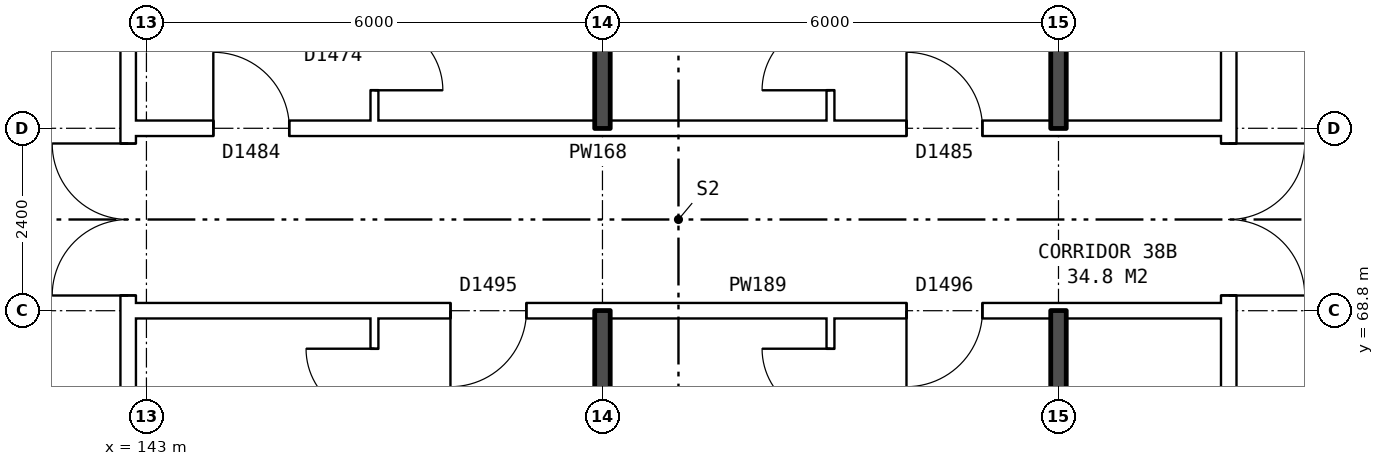
"""IFC4 building model, lengths in metres.
Left out: names, types, materials, properties, quantities, classifications, styles, units other than length and angle.
Written with IfcOpenShell. Run it as: python <this file> out.ifc"""

import sys

from ifc_helpers import new_model, si_unit, direction, frame, frame_2d, origin, place, context, subcontext, project, spatial, rectangle, extrude, element, fill, save


model = new_model("IFC4")
c1 = context("Model", 3, precision=1e-05, world=origin(), true_north=direction((0.0, 1.0)))
c2 = subcontext(c1, "Body", "Model", "MODEL_VIEW")
j1 = project(units=[si_unit("LENGTHUNIT", "METRE"), si_unit("PLANEANGLEUNIT", "RADIAN")], contexts=[c1])
p1 = place(None, origin())
s1 = spatial("IfcSite", under=j1, at=p1, CompositionType="ELEMENT")
p2 = place(p1, origin())
s2 = spatial("IfcBuilding", under=s1, at=p2, CompositionType="ELEMENT")
p3 = place(p2, frame((0.0, 0.0, 136.1)))
s3 = spatial("IfcBuildingStorey", under=s2, at=p3, CompositionType="ELEMENT", Elevation=136.1)
p4 = place(p3, frame((142.76, 63.9, 0.0), z_axis=(0.0, 0.0, 1.0), x_axis=(0.0, 1.0, 0.0)))
e1 = element("IfcWall", 1, at=p4, inside=s3, PredefinedType="PARTITIONING", context=c2, shape_type="SweptSolid", body=[
    extrude(rectangle(XDim=12.2, YDim=0.2, at=frame_2d((6.1, 0.0))), origin(), (0.0, 0.0, 1.0), 2.85),
])
p5 = place(p4, frame((5.1, 0.0, 0.0)))
e2 = element("IfcOpeningElement", 2, at=p5, cuts=e1, PredefinedType="OPENING", context=c2, shape_type="SweptSolid", body=[
    extrude(rectangle(XDim=2.0, YDim=2.1, at=frame_2d((1.0, 1.05))), frame((0.0, 0.11, 0.0), z_axis=(0.0, -1.0, 0.0), x_axis=(1.0, 0.0, 0.0)), (0.0, 0.0, 1.0), 0.22),
])
p6 = place(p3, frame((157.24, 63.9, 0.0), z_axis=(0.0, 0.0, 1.0), x_axis=(0.0, 1.0, 0.0)))
e3 = element("IfcWall", 3, at=p6, inside=s3, PredefinedType="PARTITIONING", context=c2, shape_type="SweptSolid", body=[
    extrude(rectangle(XDim=12.2, YDim=0.2, at=frame_2d((6.1, 0.0))), origin(), (0.0, 0.0, 1.0), 2.85),
])
p7 = place(p6, frame((5.1, 0.0, 0.0)))
e4 = element("IfcOpeningElement", 4, at=p7, cuts=e3, PredefinedType="OPENING", context=c2, shape_type="SweptSolid", body=[
    extrude(rectangle(XDim=2.0, YDim=2.1, at=frame_2d((1.0, 1.05))), frame((0.0, 0.11, 0.0), z_axis=(0.0, -1.0, 0.0), x_axis=(1.0, 0.0, 0.0)), (0.0, 0.0, 1.0), 0.22),
])
p8 = place(p3, frame((142.76, 68.8, 0.0), z_axis=(0.0, 0.0, 1.0), x_axis=(1.0, 0.0, 0.0)))
e5 = element("IfcWall", 5, at=p8, inside=s3, PredefinedType="PARTITIONING", context=c2, shape_type="SweptSolid", body=[
    extrude(rectangle(XDim=14.48, YDim=0.2, at=frame_2d((7.24, 0.0))), origin(), (0.0, 0.0, 1.0), 2.85),
])
p9 = place(p8, frame((4.24, 0.0, 0.0)))
e6 = element("IfcOpeningElement", 6, at=p9, cuts=e5, PredefinedType="OPENING", context=c2, shape_type="SweptSolid", body=[
    extrude(rectangle(XDim=1.0, YDim=2.1, at=frame_2d((0.5, 1.05))), frame((0.0, 0.11, 0.0), z_axis=(0.0, -1.0, 0.0), x_axis=(1.0, 0.0, 0.0)), (0.0, 0.0, 1.0), 0.22),
])
p10 = place(p8, frame((10.24, 0.0, 0.0)))
e7 = element("IfcOpeningElement", 7, at=p10, cuts=e5, PredefinedType="OPENING", context=c2, shape_type="SweptSolid", body=[
    extrude(rectangle(XDim=1.0, YDim=2.1, at=frame_2d((0.5, 1.05))), frame((0.0, 0.11, 0.0), z_axis=(0.0, -1.0, 0.0), x_axis=(1.0, 0.0, 0.0)), (0.0, 0.0, 1.0), 0.22),
])
p11 = place(p3, frame((142.76, 71.2, 0.0), z_axis=(0.0, 0.0, 1.0), x_axis=(1.0, 0.0, 0.0)))
e8 = element("IfcWall", 8, at=p11, inside=s3, PredefinedType="PARTITIONING", context=c2, shape_type="SweptSolid", body=[
    extrude(rectangle(XDim=14.48, YDim=0.2, at=frame_2d((7.24, 0.0))), origin(), (0.0, 0.0, 1.0), 2.85),
])
p12 = place(p11, frame((1.12, 0.0, 0.0)))
e9 = element("IfcOpeningElement", 9, at=p12, cuts=e8, PredefinedType="OPENING", context=c2, shape_type="SweptSolid", body=[
    extrude(rectangle(XDim=1.0, YDim=2.1, at=frame_2d((0.5, 1.05))), frame((0.0, 0.11, 0.0), z_axis=(0.0, -1.0, 0.0), x_axis=(1.0, 0.0, 0.0)), (0.0, 0.0, 1.0), 0.22),
])
p13 = place(p11, frame((10.24, 0.0, 0.0)))
e10 = element("IfcOpeningElement", 10, at=p13, cuts=e8, PredefinedType="OPENING", context=c2, shape_type="SweptSolid", body=[
    extrude(rectangle(XDim=1.0, YDim=2.1, at=frame_2d((0.5, 1.05))), frame((0.0, 0.11, 0.0), z_axis=(0.0, -1.0, 0.0), x_axis=(1.0, 0.0, 0.0)), (0.0, 0.0, 1.0), 0.22),
])
p14 = place(p3, frame((146.0, 54.36, 0.0), z_axis=(0.0, 0.0, 1.0), x_axis=(0.0, 1.0, 0.0)))
e11 = element("IfcWall", 11, at=p14, inside=s3, PredefinedType="PARTITIONING", context=c2, shape_type="SweptSolid", body=[
    extrude(rectangle(XDim=14.34, YDim=0.1, at=frame_2d((7.17, 0.0))), origin(), (0.0, 0.0, 1.0), 2.85),
])
p15 = place(p14, frame((6.7, 0.0, 0.0)))
e12 = element("IfcOpeningElement", 12, at=p15, cuts=e11, PredefinedType="OPENING", context=c2, shape_type="SweptSolid", body=[
    extrude(rectangle(XDim=0.9, YDim=2.1, at=frame_2d((0.45, 1.05))), frame((0.0, 0.06, 0.0), z_axis=(0.0, -1.0, 0.0), x_axis=(1.0, 0.0, 0.0)), (0.0, 0.0, 1.0), 0.12),
])
p16 = place(p14, frame((13.04, 0.0, 0.0)))
e13 = element("IfcOpeningElement", 13, at=p16, cuts=e11, PredefinedType="OPENING", context=c2, shape_type="SweptSolid", body=[
    extrude(rectangle(XDim=0.9, YDim=2.1, at=frame_2d((0.45, 1.05))), frame((0.0, 0.06, 0.0), z_axis=(0.0, -1.0, 0.0), x_axis=(1.0, 0.0, 0.0)), (0.0, 0.0, 1.0), 0.12),
])
p17 = place(p3, frame((146.0, 71.3, 0.0), z_axis=(0.0, 0.0, 1.0), x_axis=(0.0, 1.0, 0.0)))
e14 = element("IfcWall", 14, at=p17, inside=s3, PredefinedType="PARTITIONING", context=c2, shape_type="SweptSolid", body=[
    extrude(rectangle(XDim=14.34, YDim=0.1, at=frame_2d((7.17, 0.0))), origin(), (0.0, 0.0, 1.0), 2.85),
])
p18 = place(p17, frame((6.74, 0.0, 0.0)))
e15 = element("IfcOpeningElement", 15, at=p18, cuts=e14, PredefinedType="OPENING", context=c2, shape_type="SweptSolid", body=[
    extrude(rectangle(XDim=0.9, YDim=2.1, at=frame_2d((0.45, 1.05))), frame((0.0, 0.06, 0.0), z_axis=(0.0, -1.0, 0.0), x_axis=(1.0, 0.0, 0.0)), (0.0, 0.0, 1.0), 0.12),
])
p19 = place(p17, frame((0.4, 0.0, 0.0)))
e16 = element("IfcOpeningElement", 16, at=p19, cuts=e14, PredefinedType="OPENING", context=c2, shape_type="SweptSolid", body=[
    extrude(rectangle(XDim=0.9, YDim=2.1, at=frame_2d((0.45, 1.05))), frame((0.0, 0.06, 0.0), z_axis=(0.0, -1.0, 0.0), x_axis=(1.0, 0.0, 0.0)), (0.0, 0.0, 1.0), 0.12),
])
for number, where, z_axis, x_axis in (
    (17, (149.0, 54.36, 0.0), (0.0, 0.0, 1.0), (0.0, 1.0, 0.0)),
    (18, (149.0, 71.2, 0.0), (0.0, 0.0, 1.0), (0.0, 1.0, 0.0)),
):
    element("IfcWall", number, at=place(p3, frame(where, z_axis=z_axis, x_axis=x_axis)), inside=s3, PredefinedType="SOLIDWALL", context=c2, shape_type="SweptSolid", body=[
        extrude(rectangle(XDim=14.44, YDim=0.2, at=frame_2d((7.22, 0.0))), origin(), (0.0, 0.0, 1.0), 2.85),
    ])
p20 = place(p3, frame((152.0, 54.36, 0.0), z_axis=(0.0, 0.0, 1.0), x_axis=(0.0, 1.0, 0.0)))
e19 = element("IfcWall", 19, at=p20, inside=s3, PredefinedType="PARTITIONING", context=c2, shape_type="SweptSolid", body=[
    extrude(rectangle(XDim=14.34, YDim=0.1, at=frame_2d((7.17, 0.0))), origin(), (0.0, 0.0, 1.0), 2.85),
])
p21 = place(p20, frame((4.2, 0.0, 0.0)))
e20 = element("IfcOpeningElement", 20, at=p21, cuts=e19, PredefinedType="OPENING", context=c2, shape_type="SweptSolid", body=[
    extrude(rectangle(XDim=0.9, YDim=2.1, at=frame_2d((0.45, 1.05))), frame((0.0, 0.06, 0.0), z_axis=(0.0, -1.0, 0.0), x_axis=(1.0, 0.0, 0.0)), (0.0, 0.0, 1.0), 0.12),
])
p22 = place(p20, frame((13.04, 0.0, 0.0)))
e21 = element("IfcOpeningElement", 21, at=p22, cuts=e19, PredefinedType="OPENING", context=c2, shape_type="SweptSolid", body=[
    extrude(rectangle(XDim=0.9, YDim=2.1, at=frame_2d((0.45, 1.05))), frame((0.0, 0.06, 0.0), z_axis=(0.0, -1.0, 0.0), x_axis=(1.0, 0.0, 0.0)), (0.0, 0.0, 1.0), 0.12),
])
p23 = place(p3, frame((152.0, 71.3, 0.0), z_axis=(0.0, 0.0, 1.0), x_axis=(0.0, 1.0, 0.0)))
e22 = element("IfcWall", 22, at=p23, inside=s3, PredefinedType="PARTITIONING", context=c2, shape_type="SweptSolid", body=[
    extrude(rectangle(XDim=14.34, YDim=0.1, at=frame_2d((7.17, 0.0))), origin(), (0.0, 0.0, 1.0), 2.85),
])
p24 = place(p23, frame((7.94, 0.0, 0.0)))
e23 = element("IfcOpeningElement", 23, at=p24, cuts=e22, PredefinedType="OPENING", context=c2, shape_type="SweptSolid", body=[
    extrude(rectangle(XDim=0.9, YDim=2.1, at=frame_2d((0.45, 1.05))), frame((0.0, 0.06, 0.0), z_axis=(0.0, -1.0, 0.0), x_axis=(1.0, 0.0, 0.0)), (0.0, 0.0, 1.0), 0.12),
])
p25 = place(p23, frame((0.4, 0.0, 0.0)))
e24 = element("IfcOpeningElement", 24, at=p25, cuts=e22, PredefinedType="OPENING", context=c2, shape_type="SweptSolid", body=[
    extrude(rectangle(XDim=0.9, YDim=2.1, at=frame_2d((0.45, 1.05))), frame((0.0, 0.06, 0.0), z_axis=(0.0, -1.0, 0.0), x_axis=(1.0, 0.0, 0.0)), (0.0, 0.0, 1.0), 0.12),
])
for number, where, z_axis, x_axis in (
    (25, (155.0, 63.8, 0.0), (0.0, 0.0, 1.0), (0.0, 1.0, 0.0)),
    (26, (155.0, 71.2, 0.0), (0.0, 0.0, 1.0), (0.0, 1.0, 0.0)),
):
    element("IfcWall", number, at=place(p3, frame(where, z_axis=z_axis, x_axis=x_axis)), inside=s3, PredefinedType="SOLIDWALL", context=c2, shape_type="SweptSolid", body=[
        extrude(rectangle(XDim=5.0, YDim=0.2, at=frame_2d((2.5, 0.0))), origin(), (0.0, 0.0, 1.0), 2.85),
    ])
p26 = place(p5, origin())
e27 = element("IfcDoor", 27, at=p26, inside=s3, OperationType="DOUBLE_DOOR_SINGLE_SWING", PredefinedType="DOOR", context=c2, shape_type="SweptSolid", body=[
    extrude(rectangle(XDim=2.0, YDim=2.1, at=frame_2d((1.0, 1.05))), frame((0.0, 0.025, 0.0), z_axis=(0.0, -1.0, 0.0), x_axis=(1.0, 0.0, 0.0)), (0.0, 0.0, 1.0), 0.05),
])
fill(e2, e27)
p27 = place(p7, frame((2.0, 0.0, 0.0), z_axis=(0.0, 0.0, 1.0), x_axis=(-1.0, 0.0, 0.0)))
e28 = element("IfcDoor", 28, at=p27, inside=s3, OperationType="DOUBLE_DOOR_SINGLE_SWING", PredefinedType="DOOR", context=c2, shape_type="SweptSolid", body=[
    extrude(rectangle(XDim=2.0, YDim=2.1, at=frame_2d((1.0, 1.05))), frame((0.0, 0.025, 0.0), z_axis=(0.0, -1.0, 0.0), x_axis=(1.0, 0.0, 0.0)), (0.0, 0.0, 1.0), 0.05),
])
fill(e4, e28)
p28 = place(p9, frame((1.0, 0.0, 0.0), z_axis=(0.0, 0.0, 1.0), x_axis=(-1.0, 0.0, 0.0)))
e29 = element("IfcDoor", 29, at=p28, inside=s3, OperationType="SINGLE_SWING_RIGHT", PredefinedType="DOOR", context=c2, shape_type="SweptSolid", body=[
    extrude(rectangle(XDim=1.0, YDim=2.1, at=frame_2d((0.5, 1.05))), frame((0.0, 0.025, 0.0), z_axis=(0.0, -1.0, 0.0), x_axis=(1.0, 0.0, 0.0)), (0.0, 0.0, 1.0), 0.05),
])
fill(e6, e29)
p29 = place(p16, origin())
e30 = element("IfcDoor", 30, at=p29, inside=s3, OperationType="SINGLE_SWING_RIGHT", PredefinedType="DOOR", context=c2, shape_type="SweptSolid", body=[
    extrude(rectangle(XDim=0.9, YDim=2.1, at=frame_2d((0.45, 1.05))), frame((0.0, 0.025, 0.0), z_axis=(0.0, -1.0, 0.0), x_axis=(1.0, 0.0, 0.0)), (0.0, 0.0, 1.0), 0.05),
])
fill(e13, e30)
p30 = place(p10, frame((1.0, 0.0, 0.0), z_axis=(0.0, 0.0, 1.0), x_axis=(-1.0, 0.0, 0.0)))
e31 = element("IfcDoor", 31, at=p30, inside=s3, OperationType="SINGLE_SWING_RIGHT", PredefinedType="DOOR", context=c2, shape_type="SweptSolid", body=[
    extrude(rectangle(XDim=1.0, YDim=2.1, at=frame_2d((0.5, 1.05))), frame((0.0, 0.025, 0.0), z_axis=(0.0, -1.0, 0.0), x_axis=(1.0, 0.0, 0.0)), (0.0, 0.0, 1.0), 0.05),
])
fill(e7, e31)
p31 = place(p22, origin())
e32 = element("IfcDoor", 32, at=p31, inside=s3, OperationType="SINGLE_SWING_RIGHT", PredefinedType="DOOR", context=c2, shape_type="SweptSolid", body=[
    extrude(rectangle(XDim=0.9, YDim=2.1, at=frame_2d((0.45, 1.05))), frame((0.0, 0.025, 0.0), z_axis=(0.0, -1.0, 0.0), x_axis=(1.0, 0.0, 0.0)), (0.0, 0.0, 1.0), 0.05),
])
fill(e21, e32)
p32 = place(p12, origin())
e33 = element("IfcDoor", 33, at=p32, inside=s3, OperationType="SINGLE_SWING_LEFT", PredefinedType="DOOR", context=c2, shape_type="SweptSolid", body=[
    extrude(rectangle(XDim=1.0, YDim=2.1, at=frame_2d((0.5, 1.05))), frame((0.0, 0.025, 0.0), z_axis=(0.0, -1.0, 0.0), x_axis=(1.0, 0.0, 0.0)), (0.0, 0.0, 1.0), 0.05),
])
fill(e9, e33)
p33 = place(p19, frame((0.9, 0.0, 0.0), z_axis=(0.0, 0.0, 1.0), x_axis=(-1.0, 0.0, 0.0)))
e34 = element("IfcDoor", 34, at=p33, inside=s3, OperationType="SINGLE_SWING_RIGHT", PredefinedType="DOOR", context=c2, shape_type="SweptSolid", body=[
    extrude(rectangle(XDim=0.9, YDim=2.1, at=frame_2d((0.45, 1.05))), frame((0.0, 0.025, 0.0), z_axis=(0.0, -1.0, 0.0), x_axis=(1.0, 0.0, 0.0)), (0.0, 0.0, 1.0), 0.05),
])
fill(e16, e34)
p34 = place(p13, origin())
e35 = element("IfcDoor", 35, at=p34, inside=s3, OperationType="SINGLE_SWING_LEFT", PredefinedType="DOOR", context=c2, shape_type="SweptSolid", body=[
    extrude(rectangle(XDim=1.0, YDim=2.1, at=frame_2d((0.5, 1.05))), frame((0.0, 0.025, 0.0), z_axis=(0.0, -1.0, 0.0), x_axis=(1.0, 0.0, 0.0)), (0.0, 0.0, 1.0), 0.05),
])
fill(e10, e35)
p35 = place(p25, origin())
e36 = element("IfcDoor", 36, at=p35, inside=s3, OperationType="SINGLE_SWING_LEFT", PredefinedType="DOOR", context=c2, shape_type="SweptSolid", body=[
    extrude(rectangle(XDim=0.9, YDim=2.1, at=frame_2d((0.45, 1.05))), frame((0.0, 0.025, 0.0), z_axis=(0.0, -1.0, 0.0), x_axis=(1.0, 0.0, 0.0)), (0.0, 0.0, 1.0), 0.05),
])
fill(e24, e36)
save(model, sys.argv[1])
